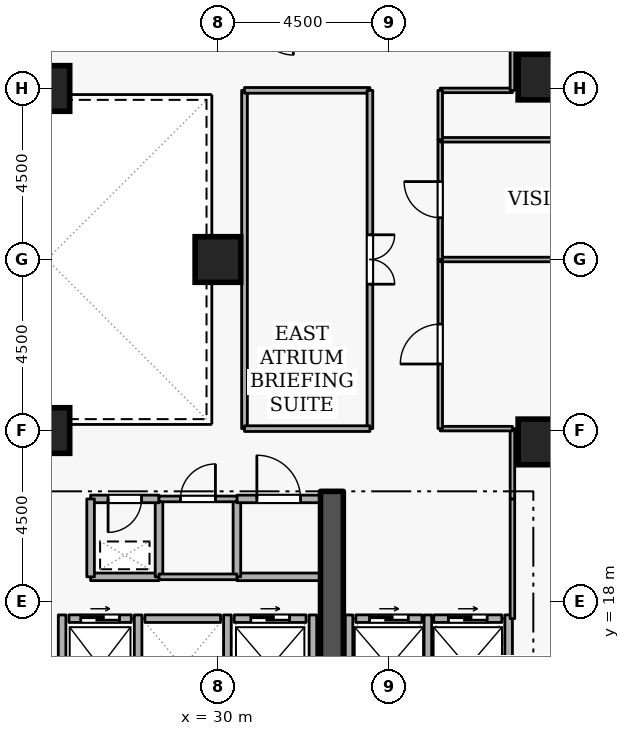
"""IFC4 building model, lengths in metres.
Left out: names, types, materials, properties, quantities, classifications, styles, units other than length and angle.
Written with IfcOpenShell. Run it as: python <this file> out.ifc"""

import sys

from ifc_helpers import new_model, si_unit, direction, frame, frame_2d, origin, origin_2d, place, context, subcontext, project, spatial, rectangle, extrude, element, fill, save


model = new_model("IFC4")
c1 = context("Model", 3, precision=1e-05, world=origin(), true_north=direction((0.0, 1.0)))
c2 = subcontext(c1, "Body", "Model", "MODEL_VIEW")
j1 = project(units=[si_unit("LENGTHUNIT", "METRE"), si_unit("PLANEANGLEUNIT", "RADIAN")], contexts=[c1])
p1 = place(None, origin())
s1 = spatial("IfcSite", under=j1, at=p1, CompositionType="ELEMENT")
p2 = place(p1, origin())
s2 = spatial("IfcBuilding", under=s1, at=p2, CompositionType="ELEMENT")
p3 = place(p2, frame((0.0, 0.0, 87.3)))
s3 = spatial("IfcBuildingStorey", under=s2, at=p3, CompositionType="ELEMENT", Elevation=87.3)
p4 = place(p3, frame((33.0, 15.2, 0.0), z_axis=(0.0, 0.0, 1.0), x_axis=(0.0, 1.0, 0.0)))
e1 = element("IfcWall", 1, at=p4, inside=s3, PredefinedType="SHEAR", context=c2, shape_type="SweptSolid", body=[
    extrude(rectangle(XDim=5.7, YDim=0.6, at=frame_2d((2.85, 0.0))), origin(), (0.0, 0.0, 1.0), 3.6),
])
for number, where, z_axis, x_axis in (
    (2, (38.5, 22.2, 0.0), (0.0, 0.0, 1.0), (1.0, 0.0, 0.0)),
    (3, (38.5, 31.8, 0.0), (0.0, 0.0, 1.0), (1.0, 0.0, 0.0)),
    (4, (25.5, 22.5, 0.0), (0.0, 0.0, 1.0), (1.0, 0.0, 0.0)),
    (5, (25.5, 31.5, 0.0), (0.0, 0.0, 1.0), (1.0, 0.0, 0.0)),
    (6, (30.0, 27.0, 0.0), (0.0, 0.0, 1.0), (1.0, 0.0, 0.0)),
):
    element("IfcColumn", number, at=place(p3, frame(where, z_axis=z_axis, x_axis=x_axis)), inside=s3, PredefinedType="COLUMN", context=c2, shape_type="SweptSolid", body=[
        extrude(rectangle(XDim=1.2, YDim=1.2, at=origin_2d()), origin(), (0.0, 0.0, 1.0), 3.6),
    ])
p5 = place(p3, frame((26.08, 17.55, 0.0), z_axis=(0.0, 0.0, 1.0), x_axis=(1.0, 0.0, 0.0)))
e7 = element("IfcWall", 7, at=p5, inside=s3, PredefinedType="STANDARD", context=c2, shape_type="SweptSolid", body=[
    extrude(rectangle(XDim=1.64, YDim=0.2, at=frame_2d((0.82, 0.0))), origin(), (0.0, 0.0, 1.0), 3.34),
])
p6 = place(p5, frame((0.31, 0.0, 0.0)))
e8 = element("IfcOpeningElement", 8, at=p6, cuts=e7, PredefinedType="OPENING", context=c2, shape_type="SweptSolid", body=[
    extrude(rectangle(XDim=1.02, YDim=2.06, at=frame_2d((0.51, 1.03))), frame((0.0, 0.11, 0.0), z_axis=(0.0, -1.0, 0.0), x_axis=(1.0, 0.0, 0.0)), (0.0, 0.0, 1.0), 0.22),
])
p7 = place(p3, frame((28.08, 17.55, 0.0), z_axis=(0.0, 0.0, 1.0), x_axis=(1.0, 0.0, 0.0)))
e9 = element("IfcWall", 9, at=p7, inside=s3, PredefinedType="STANDARD", context=c2, shape_type="SweptSolid", body=[
    extrude(rectangle(XDim=1.99, YDim=0.2, at=frame_2d((0.995, 0.0))), origin(), (0.0, 0.0, 1.0), 3.34),
])
p8 = place(p3, frame((30.43, 17.55, 0.0), z_axis=(0.0, 0.0, 1.0), x_axis=(1.0, 0.0, 0.0)))
e10 = element("IfcWall", 10, at=p8, inside=s3, PredefinedType="STANDARD", context=c2, shape_type="SweptSolid", body=[
    extrude(rectangle(XDim=1.89, YDim=0.2, at=frame_2d((0.945, 0.0))), origin(), (0.0, 0.0, 1.0), 3.34),
])
p9 = place(p8, frame((0.435, 0.0, 0.0)))
e11 = element("IfcOpeningElement", 11, at=p9, cuts=e10, PredefinedType="OPENING", context=c2, shape_type="SweptSolid", body=[
    extrude(rectangle(XDim=1.02, YDim=2.06, at=frame_2d((0.51, 1.03))), frame((0.0, 0.11, 0.0), z_axis=(0.0, -1.0, 0.0), x_axis=(1.0, 0.0, 0.0)), (0.0, 0.0, 1.0), 0.22),
])
p10 = place(p3, frame((33.63, 17.55, 0.0), z_axis=(0.0, 0.0, 1.0), x_axis=(1.0, 0.0, 0.0)))
e12 = element("IfcWall", 12, at=p10, inside=s3, PredefinedType="STANDARD", context=c2, shape_type="SweptSolid", body=[
    extrude(rectangle(XDim=1.74, YDim=0.2, at=frame_2d((0.87, 0.0))), origin(), (0.0, 0.0, 1.0), 3.34),
])
p11 = place(p10, frame((0.36, 0.0, 0.0)))
e13 = element("IfcOpeningElement", 13, at=p11, cuts=e12, PredefinedType="OPENING", context=c2, shape_type="SweptSolid", body=[
    extrude(rectangle(XDim=1.02, YDim=2.06, at=frame_2d((0.51, 1.03))), frame((0.0, 0.11, 0.0), z_axis=(0.0, -1.0, 0.0), x_axis=(1.0, 0.0, 0.0)), (0.0, 0.0, 1.0), 0.22),
])
p12 = place(p3, frame((35.68, 17.55, 0.0), z_axis=(0.0, 0.0, 1.0), x_axis=(1.0, 0.0, 0.0)))
e14 = element("IfcWall", 14, at=p12, inside=s3, PredefinedType="STANDARD", context=c2, shape_type="SweptSolid", body=[
    extrude(rectangle(XDim=1.79, YDim=0.2, at=frame_2d((0.895, 0.0))), origin(), (0.0, 0.0, 1.0), 3.34),
])
p13 = place(p12, frame((0.385, 0.0, 0.0)))
e15 = element("IfcOpeningElement", 15, at=p13, cuts=e14, PredefinedType="OPENING", context=c2, shape_type="SweptSolid", body=[
    extrude(rectangle(XDim=1.02, YDim=2.06, at=frame_2d((0.51, 1.03))), frame((0.0, 0.11, 0.0), z_axis=(0.0, -1.0, 0.0), x_axis=(1.0, 0.0, 0.0)), (0.0, 0.0, 1.0), 0.22),
])
for number, where, z_axis, x_axis in (
    (16, (27.9, 15.212, 0.0), (0.0, 0.0, 1.0), (0.0, 1.0, 0.0)),
    (17, (25.9, 15.212, 0.0), (0.0, 0.0, 1.0), (0.0, 1.0, 0.0)),
    (18, (30.25, 15.212, 0.0), (0.0, 0.0, 1.0), (0.0, 1.0, 0.0)),
    (19, (32.5, 15.212, 0.0), (0.0, 0.0, 1.0), (0.0, 1.0, 0.0)),
):
    element("IfcWall", number, at=place(p3, frame(where, z_axis=z_axis, x_axis=x_axis)), inside=s3, PredefinedType="STANDARD", context=c2, shape_type="SweptSolid", body=[
        extrude(rectangle(XDim=2.436, YDim=0.2, at=frame_2d((1.218, 0.0))), origin(), (0.0, 0.0, 1.0), 3.34),
    ])
for number, where, z_axis, x_axis in (
    (20, (35.525, 15.012, 0.0), (0.0, 0.0, 1.0), (0.0, 1.0, 0.0)),
    (21, (33.45, 15.012, 0.0), (0.0, 0.0, 1.0), (0.0, 1.0, 0.0)),
    (22, (37.65, 15.012, 0.0), (0.0, 0.0, 1.0), (0.0, 1.0, 0.0)),
):
    element("IfcWall", number, at=place(p3, frame(where, z_axis=z_axis, x_axis=x_axis)), inside=s3, PredefinedType="STANDARD", context=c2, shape_type="SweptSolid", body=[
        extrude(rectangle(XDim=2.636, YDim=0.2, at=frame_2d((1.318, 0.0))), origin(), (0.0, 0.0, 1.0), 3.34),
    ])
p14 = place(p3, frame((26.65, 18.65, 0.0), z_axis=(0.0, 0.0, 1.0), x_axis=(1.0, 0.0, 0.0)))
e23 = element("IfcWall", 23, at=p14, inside=s3, PredefinedType="STANDARD", context=c2, shape_type="SweptSolid", body=[
    extrude(rectangle(XDim=1.8, YDim=0.2, at=frame_2d((0.9, 0.0))), origin(), (0.0, 0.0, 1.0), 3.34),
])
p15 = place(p3, frame((28.45, 18.65, 0.0), z_axis=(0.0, 0.0, 1.0), x_axis=(0.0, 1.0, 0.0)))
e24 = element("IfcWall", 24, at=p15, inside=s3, PredefinedType="STANDARD", context=c2, shape_type="SweptSolid", body=[
    extrude(rectangle(XDim=2.05, YDim=0.2, at=frame_2d((1.025, 0.0))), origin(), (0.0, 0.0, 1.0), 3.34),
])
p16 = place(p3, frame((28.45, 20.7, 0.0), z_axis=(0.0, 0.0, 1.0), x_axis=(-1.0, 0.0, 0.0)))
e25 = element("IfcWall", 25, at=p16, inside=s3, PredefinedType="STANDARD", context=c2, shape_type="SweptSolid", body=[
    extrude(rectangle(XDim=1.8, YDim=0.2, at=frame_2d((0.9, 0.0))), origin(), (0.0, 0.0, 1.0), 3.34),
])
p17 = place(p16, frame((0.46, 0.0, 0.0)))
e26 = element("IfcOpeningElement", 26, at=p17, cuts=e25, PredefinedType="OPENING", context=c2, shape_type="SweptSolid", body=[
    extrude(rectangle(XDim=0.88, YDim=2.04, at=frame_2d((0.44, 1.02))), frame((0.0, 0.11, 0.0), z_axis=(0.0, -1.0, 0.0), x_axis=(1.0, 0.0, 0.0)), (0.0, 0.0, 1.0), 0.22),
])
p18 = place(p3, frame((26.65, 20.7, 0.0), z_axis=(0.0, 0.0, 1.0), x_axis=(0.0, -1.0, 0.0)))
e27 = element("IfcWall", 27, at=p18, inside=s3, PredefinedType="STANDARD", context=c2, shape_type="SweptSolid", body=[
    extrude(rectangle(XDim=2.05, YDim=0.2, at=frame_2d((1.025, 0.0))), origin(), (0.0, 0.0, 1.0), 3.34),
])
p19 = place(p3, frame((32.7, 18.65, 0.0), z_axis=(0.0, 0.0, 1.0), x_axis=(-1.0, 0.0, 0.0)))
e28 = element("IfcWall", 28, at=p19, inside=s3, PredefinedType="STANDARD", context=c2, shape_type="SweptSolid", body=[
    extrude(rectangle(XDim=2.2, YDim=0.2, at=frame_2d((1.1, 0.0))), origin(), (0.0, 0.0, 1.0), 3.34),
])
p20 = place(p3, frame((30.5, 18.65, 0.0), z_axis=(0.0, 0.0, 1.0), x_axis=(0.0, 1.0, 0.0)))
e29 = element("IfcWall", 29, at=p20, inside=s3, PredefinedType="STANDARD", context=c2, shape_type="SweptSolid", body=[
    extrude(rectangle(XDim=2.05, YDim=0.2, at=frame_2d((1.025, 0.0))), origin(), (0.0, 0.0, 1.0), 3.34),
])
p21 = place(p3, frame((30.5, 20.7, 0.0), z_axis=(0.0, 0.0, 1.0), x_axis=(1.0, 0.0, 0.0)))
e30 = element("IfcWall", 30, at=p21, inside=s3, PredefinedType="STANDARD", context=c2, shape_type="SweptSolid", body=[
    extrude(rectangle(XDim=2.2, YDim=0.2, at=frame_2d((1.1, 0.0))), origin(), (0.0, 0.0, 1.0), 3.34),
])
p22 = place(p21, frame((0.525, 0.0, 0.0)))
e31 = element("IfcOpeningElement", 31, at=p22, cuts=e30, PredefinedType="OPENING", context=c2, shape_type="SweptSolid", body=[
    extrude(rectangle(XDim=1.15, YDim=2.1, at=frame_2d((0.575, 1.05))), frame((0.0, 0.11, 0.0), z_axis=(0.0, -1.0, 0.0), x_axis=(1.0, 0.0, 0.0)), (0.0, 0.0, 1.0), 0.22),
])
p23 = place(p3, frame((30.5, 18.65, 0.0), z_axis=(0.0, 0.0, 1.0), x_axis=(-1.0, 0.0, 0.0)))
e32 = element("IfcWall", 32, at=p23, inside=s3, PredefinedType="PARTITIONING", context=c2, shape_type="SweptSolid", body=[
    extrude(rectangle(XDim=2.05, YDim=0.15, at=frame_2d((1.025, 0.0))), origin(), (0.0, 0.0, 1.0), 3.34),
])
p24 = place(p3, frame((28.45, 20.7, 0.0), z_axis=(0.0, 0.0, 1.0), x_axis=(1.0, 0.0, 0.0)))
e33 = element("IfcWall", 33, at=p24, inside=s3, PredefinedType="PARTITIONING", context=c2, shape_type="SweptSolid", body=[
    extrude(rectangle(XDim=2.05, YDim=0.15, at=frame_2d((1.025, 0.0))), origin(), (0.0, 0.0, 1.0), 3.34),
])
p25 = place(p24, frame((0.565, 0.0, 0.0)))
e34 = element("IfcOpeningElement", 34, at=p25, cuts=e33, PredefinedType="OPENING", context=c2, shape_type="SweptSolid", body=[
    extrude(rectangle(XDim=0.92, YDim=2.08, at=frame_2d((0.46, 1.04))), frame((0.0, 0.085, 0.0), z_axis=(0.0, -1.0, 0.0), x_axis=(1.0, 0.0, 0.0)), (0.0, 0.0, 1.0), 0.17),
])
p26 = place(p3, frame((37.75, 17.55, 0.0), z_axis=(0.0, 0.0, 1.0), x_axis=(0.0, 1.0, 0.0)))
e35 = element("IfcWall", 35, at=p26, inside=s3, PredefinedType="PARTITIONING", context=c2, shape_type="SweptSolid", body=[
    extrude(rectangle(XDim=3.15, YDim=0.12, at=frame_2d((1.575, 0.0))), origin(), (0.0, 0.0, 1.0), 3.34),
])
p27 = place(p3, frame((37.75, 20.7, 0.0), z_axis=(0.0, 0.0, 1.0), x_axis=(0.0, 1.0, 0.0)))
e36 = element("IfcWall", 36, at=p27, inside=s3, PredefinedType="PARTITIONING", context=c2, shape_type="SweptSolid", body=[
    extrude(rectangle(XDim=1.85, YDim=0.12, at=frame_2d((0.925, 0.0))), origin(), (0.0, 0.0, 1.0), 3.34),
])
p28 = place(p3, frame((37.75, 22.55, 0.0), z_axis=(0.0, 0.0, 1.0), x_axis=(-1.0, 0.0, 0.0)))
e37 = element("IfcWall", 37, at=p28, inside=s3, PredefinedType="PARTITIONING", context=c2, shape_type="SweptSolid", body=[
    extrude(rectangle(XDim=1.9, YDim=0.12, at=frame_2d((0.95, 0.0))), origin(), (0.0, 0.0, 1.0), 3.34),
])
p29 = place(p3, frame((35.85, 22.55, 0.0), z_axis=(0.0, 0.0, 1.0), x_axis=(0.0, 1.0, 0.0)))
e38 = element("IfcWall", 38, at=p29, inside=s3, PredefinedType="PARTITIONING", context=c2, shape_type="SweptSolid", body=[
    extrude(rectangle(XDim=4.45, YDim=0.12, at=frame_2d((2.225, 0.0))), origin(), (0.0, 0.0, 1.0), 3.34),
])
p30 = place(p29, frame((1.7, 0.0, 0.0)))
e39 = element("IfcOpeningElement", 39, at=p30, cuts=e38, PredefinedType="OPENING", context=c2, shape_type="SweptSolid", body=[
    extrude(rectangle(XDim=1.05, YDim=2.1, at=frame_2d((0.525, 1.05))), frame((0.0, 0.07, 0.0), z_axis=(0.0, -1.0, 0.0), x_axis=(1.0, 0.0, 0.0)), (0.0, 0.0, 1.0), 0.14),
])
p31 = place(p3, frame((35.85, 27.0, 0.0), z_axis=(0.0, 0.0, 1.0), x_axis=(1.0, 0.0, 0.0)))
e40 = element("IfcWall", 40, at=p31, inside=s3, PredefinedType="PARTITIONING", context=c2, shape_type="SweptSolid", body=[
    extrude(rectangle(XDim=13.57, YDim=0.12, at=frame_2d((6.785, 0.0))), origin(), (0.0, 0.0, 1.0), 2.932),
])
p32 = place(p3, frame((35.85, 27.0, 0.0), z_axis=(0.0, 0.0, 1.0), x_axis=(0.0, 1.0, 0.0)))
e41 = element("IfcWall", 41, at=p32, inside=s3, PredefinedType="PARTITIONING", context=c2, shape_type="SweptSolid", body=[
    extrude(rectangle(XDim=3.15, YDim=0.12, at=frame_2d((1.575, 0.0))), origin(), (0.0, 0.0, 1.0), 3.34),
])
p33 = place(p32, frame((1.1, 0.0, 0.0)))
e42 = element("IfcOpeningElement", 42, at=p33, cuts=e41, PredefinedType="OPENING", context=c2, shape_type="SweptSolid", body=[
    extrude(rectangle(XDim=0.95, YDim=2.1, at=frame_2d((0.475, 1.05))), frame((0.0, 0.07, 0.0), z_axis=(0.0, -1.0, 0.0), x_axis=(1.0, 0.0, 0.0)), (0.0, 0.0, 1.0), 0.14),
])
p34 = place(p3, frame((35.85, 30.15, 0.0), z_axis=(0.0, 0.0, 1.0), x_axis=(1.0, 0.0, 0.0)))
e43 = element("IfcWall", 43, at=p34, inside=s3, PredefinedType="PARTITIONING", context=c2, shape_type="SweptSolid", body=[
    extrude(rectangle(XDim=13.57, YDim=0.12, at=frame_2d((6.785, 0.0))), origin(), (0.0, 0.0, 1.0), 3.34),
])
p35 = place(p3, frame((35.85, 31.45, 0.0), z_axis=(0.0, 0.0, 1.0), x_axis=(1.0, 0.0, 0.0)))
e44 = element("IfcWall", 44, at=p35, inside=s3, PredefinedType="PARTITIONING", context=c2, shape_type="SweptSolid", body=[
    extrude(rectangle(XDim=1.9, YDim=0.12, at=frame_2d((0.95, 0.0))), origin(), (0.0, 0.0, 1.0), 3.34),
])
p36 = place(p3, frame((37.75, 31.45, 0.0), z_axis=(0.0, 0.0, 1.0), x_axis=(0.0, 1.0, 0.0)))
e45 = element("IfcWall", 45, at=p36, inside=s3, PredefinedType="PARTITIONING", context=c2, shape_type="SweptSolid", body=[
    extrude(rectangle(XDim=1.85, YDim=0.12, at=frame_2d((0.925, 0.0))), origin(), (0.0, 0.0, 1.0), 3.34),
])
p37 = place(p3, frame((35.85, 30.15, 0.0), z_axis=(0.0, 0.0, 1.0), x_axis=(0.0, 1.0, 0.0)))
e46 = element("IfcWall", 46, at=p37, inside=s3, PredefinedType="PARTITIONING", context=c2, shape_type="SweptSolid", body=[
    extrude(rectangle(XDim=1.3, YDim=0.12, at=frame_2d((0.65, 0.0))), origin(), (0.0, 0.0, 1.0), 3.34),
])
p38 = place(p3, frame((30.7, 22.55, 0.0), z_axis=(0.0, 0.0, 1.0), x_axis=(0.0, 1.0, 0.0)))
e47 = element("IfcWall", 47, at=p38, inside=s3, PredefinedType="PARTITIONING", context=c2, shape_type="SweptSolid", body=[
    extrude(rectangle(XDim=8.9, YDim=0.15, at=frame_2d((4.45, 0.0))), origin(), (0.0, 0.0, 1.0), 3.34),
])
p39 = place(p3, frame((30.7, 31.45, 0.0), z_axis=(0.0, 0.0, 1.0), x_axis=(1.0, 0.0, 0.0)))
e48 = element("IfcWall", 48, at=p39, inside=s3, PredefinedType="PARTITIONING", context=c2, shape_type="SweptSolid", body=[
    extrude(rectangle(XDim=3.3, YDim=0.15, at=frame_2d((1.65, 0.0))), origin(), (0.0, 0.0, 1.0), 3.34),
])
p40 = place(p3, frame((34.0, 31.45, 0.0), z_axis=(0.0, 0.0, 1.0), x_axis=(0.0, -1.0, 0.0)))
e49 = element("IfcWall", 49, at=p40, inside=s3, PredefinedType="PARTITIONING", context=c2, shape_type="SweptSolid", body=[
    extrude(rectangle(XDim=8.9, YDim=0.15, at=frame_2d((4.45, 0.0))), origin(), (0.0, 0.0, 1.0), 3.34),
])
p41 = place(p40, frame((3.8, 0.0, 0.0)))
e50 = element("IfcOpeningElement", 50, at=p41, cuts=e49, PredefinedType="OPENING", context=c2, shape_type="SweptSolid", body=[
    extrude(rectangle(XDim=1.3, YDim=2.12, at=frame_2d((0.65, 1.06))), frame((0.0, 0.085, 0.0), z_axis=(0.0, -1.0, 0.0), x_axis=(1.0, 0.0, 0.0)), (0.0, 0.0, 1.0), 0.17),
])
p42 = place(p3, frame((34.0, 22.55, 0.0), z_axis=(0.0, 0.0, 1.0), x_axis=(-1.0, 0.0, 0.0)))
e51 = element("IfcWall", 51, at=p42, inside=s3, PredefinedType="PARTITIONING", context=c2, shape_type="SweptSolid", body=[
    extrude(rectangle(XDim=3.3, YDim=0.15, at=frame_2d((1.65, 0.0))), origin(), (0.0, 0.0, 1.0), 3.34),
])
p43 = place(p6, origin())
e52 = element("IfcDoor", 52, at=p43, inside=s3, OperationType="SLIDING_TO_LEFT", PredefinedType="DOOR", context=c2, shape_type="SweptSolid", body=[
    extrude(rectangle(XDim=1.02, YDim=2.06, at=frame_2d((0.51, 1.03))), frame((0.0, 0.025, 0.0), z_axis=(0.0, -1.0, 0.0), x_axis=(1.0, 0.0, 0.0)), (0.0, 0.0, 1.0), 0.05),
])
fill(e8, e52)
p44 = place(p9, origin())
e53 = element("IfcDoor", 53, at=p44, inside=s3, OperationType="SLIDING_TO_LEFT", PredefinedType="DOOR", context=c2, shape_type="SweptSolid", body=[
    extrude(rectangle(XDim=1.02, YDim=2.06, at=frame_2d((0.51, 1.03))), frame((0.0, 0.025, 0.0), z_axis=(0.0, -1.0, 0.0), x_axis=(1.0, 0.0, 0.0)), (0.0, 0.0, 1.0), 0.05),
])
fill(e11, e53)
p45 = place(p11, origin())
e54 = element("IfcDoor", 54, at=p45, inside=s3, OperationType="SLIDING_TO_LEFT", PredefinedType="DOOR", context=c2, shape_type="SweptSolid", body=[
    extrude(rectangle(XDim=1.02, YDim=2.06, at=frame_2d((0.51, 1.03))), frame((0.0, 0.025, 0.0), z_axis=(0.0, -1.0, 0.0), x_axis=(1.0, 0.0, 0.0)), (0.0, 0.0, 1.0), 0.05),
])
fill(e13, e54)
p46 = place(p13, origin())
e55 = element("IfcDoor", 55, at=p46, inside=s3, OperationType="SLIDING_TO_LEFT", PredefinedType="DOOR", context=c2, shape_type="SweptSolid", body=[
    extrude(rectangle(XDim=1.02, YDim=2.06, at=frame_2d((0.51, 1.03))), frame((0.0, 0.025, 0.0), z_axis=(0.0, -1.0, 0.0), x_axis=(1.0, 0.0, 0.0)), (0.0, 0.0, 1.0), 0.05),
])
fill(e15, e55)
p47 = place(p17, origin())
e56 = element("IfcDoor", 56, at=p47, inside=s3, OperationType="SINGLE_SWING_RIGHT", PredefinedType="DOOR", context=c2, shape_type="SweptSolid", body=[
    extrude(rectangle(XDim=0.88, YDim=2.04, at=frame_2d((0.44, 1.02))), frame((0.0, 0.025, 0.0), z_axis=(0.0, -1.0, 0.0), x_axis=(1.0, 0.0, 0.0)), (0.0, 0.0, 1.0), 0.05),
])
fill(e26, e56)
p48 = place(p25, origin())
e57 = element("IfcDoor", 57, at=p48, inside=s3, OperationType="SINGLE_SWING_RIGHT", PredefinedType="DOOR", context=c2, shape_type="SweptSolid", body=[
    extrude(rectangle(XDim=0.92, YDim=2.08, at=frame_2d((0.46, 1.04))), frame((0.0, 0.025, 0.0), z_axis=(0.0, -1.0, 0.0), x_axis=(1.0, 0.0, 0.0)), (0.0, 0.0, 1.0), 0.05),
])
fill(e34, e57)
p49 = place(p22, origin())
e58 = element("IfcDoor", 58, at=p49, inside=s3, OperationType="SINGLE_SWING_LEFT", PredefinedType="DOOR", context=c2, shape_type="SweptSolid", body=[
    extrude(rectangle(XDim=1.15, YDim=2.1, at=frame_2d((0.575, 1.05))), frame((0.0, 0.025, 0.0), z_axis=(0.0, -1.0, 0.0), x_axis=(1.0, 0.0, 0.0)), (0.0, 0.0, 1.0), 0.05),
])
fill(e31, e58)
p50 = place(p30, origin())
e59 = element("IfcDoor", 59, at=p50, inside=s3, OperationType="SINGLE_SWING_LEFT", PredefinedType="DOOR", context=c2, shape_type="SweptSolid", body=[
    extrude(rectangle(XDim=1.05, YDim=2.1, at=frame_2d((0.525, 1.05))), frame((0.0, 0.025, 0.0), z_axis=(0.0, -1.0, 0.0), x_axis=(1.0, 0.0, 0.0)), (0.0, 0.0, 1.0), 0.05),
])
fill(e39, e59)
p51 = place(p33, origin())
e60 = element("IfcDoor", 60, at=p51, inside=s3, OperationType="SINGLE_SWING_RIGHT", PredefinedType="DOOR", context=c2, shape_type="SweptSolid", body=[
    extrude(rectangle(XDim=0.95, YDim=2.1, at=frame_2d((0.475, 1.05))), frame((0.0, 0.025, 0.0), z_axis=(0.0, -1.0, 0.0), x_axis=(1.0, 0.0, 0.0)), (0.0, 0.0, 1.0), 0.05),
])
fill(e42, e60)
p52 = place(p41, origin())
e61 = element("IfcDoor", 61, at=p52, inside=s3, OperationType="DOUBLE_DOOR_SINGLE_SWING", PredefinedType="DOOR", context=c2, shape_type="SweptSolid", body=[
    extrude(rectangle(XDim=1.3, YDim=2.12, at=frame_2d((0.65, 1.06))), frame((0.0, 0.025, 0.0), z_axis=(0.0, -1.0, 0.0), x_axis=(1.0, 0.0, 0.0)), (0.0, 0.0, 1.0), 0.05),
])
fill(e50, e61)
save(model, sys.argv[1])
